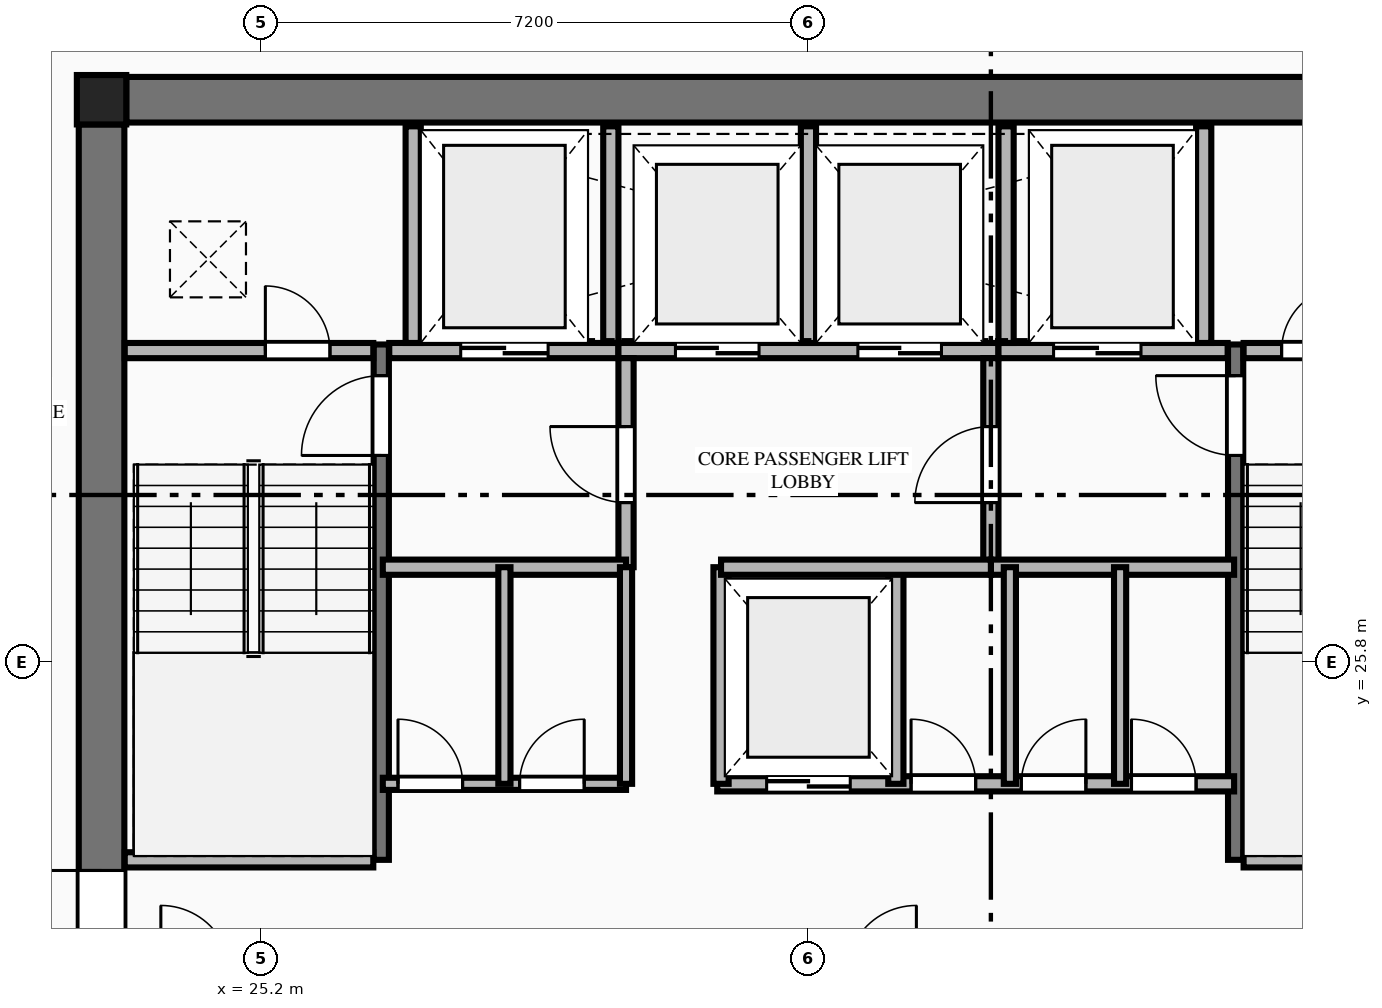
"""IFC4 building model, lengths in metres.
Left out: names, types, materials, properties, quantities, classifications, styles, units other than length and angle.
Written with IfcOpenShell. Run it as: python <this file> out.ifc"""

import sys

from ifc_helpers import new_model, si_unit, direction, frame, frame_2d, origin, origin_2d, place, context, subcontext, project, spatial, rectangle, extrude, element, fill, save


model = new_model("IFC4")
c1 = context("Model", 3, precision=1e-05, world=origin(), true_north=direction((0.0, 1.0)))
c2 = subcontext(c1, "Body", "Model", "MODEL_VIEW")
j1 = project(units=[si_unit("LENGTHUNIT", "METRE"), si_unit("PLANEANGLEUNIT", "RADIAN")], contexts=[c1])
p1 = place(None, origin())
s1 = spatial("IfcSite", under=j1, at=p1, CompositionType="ELEMENT")
p2 = place(p1, origin())
s2 = spatial("IfcBuilding", under=s1, at=p2, CompositionType="ELEMENT")
p3 = place(p2, frame((0.0, 0.0, 175.45)))
s3 = spatial("IfcBuildingStorey", under=s2, at=p3, CompositionType="ELEMENT", Elevation=175.45)
p4 = place(p3, frame((23.1, 33.2, 0.0), z_axis=(0.0, 0.0, 1.0), x_axis=(1.0, 0.0, 0.0)))
e1 = element("IfcColumn", 1, at=p4, inside=s3, PredefinedType="COLUMN", context=c2, shape_type="SweptSolid", body=[
    extrude(rectangle(XDim=0.65, YDim=0.65, at=origin_2d()), origin(), (0.0, 0.0, 1.0), 3.55),
])
p5 = place(p3, frame((23.425, 33.2, 0.0), z_axis=(0.0, 0.0, 1.0), x_axis=(1.0, 0.0, 0.0)))
e2 = element("IfcWall", 2, at=p5, inside=s3, PredefinedType="SHEAR", context=c2, shape_type="SweptSolid", body=[
    extrude(rectangle(XDim=17.95, YDim=0.6, at=frame_2d((8.975, 0.0))), origin(), (0.0, 0.0, 1.0), 3.35),
])
p6 = place(p3, frame((23.1, 18.925, 0.0), z_axis=(0.0, 0.0, 1.0), x_axis=(0.0, 1.0, 0.0)))
e3 = element("IfcWall", 3, at=p6, inside=s3, PredefinedType="SHEAR", context=c2, shape_type="SweptSolid", body=[
    extrude(rectangle(XDim=13.95, YDim=0.6, at=frame_2d((6.975, 0.0))), origin(), (0.0, 0.0, 1.0), 3.35),
])
p7 = place(p6, frame((2.915, 0.0, 0.0)))
e4 = element("IfcOpeningElement", 4, at=p7, cuts=e3, PredefinedType="OPENING", context=c2, shape_type="SweptSolid", body=[
    extrude(rectangle(XDim=1.22, YDim=2.25, at=frame_2d((0.61, 1.125))), frame((0.0, 0.31, 0.0), z_axis=(0.0, -1.0, 0.0), x_axis=(1.0, 0.0, 0.0)), (0.0, 0.0, 1.0), 0.62),
])
p8 = place(p3, frame((26.78, 23.2, 0.0), z_axis=(0.0, 0.0, 1.0), x_axis=(0.0, 1.0, 0.0)))
e5 = element("IfcWall", 5, at=p8, inside=s3, PredefinedType="SHEAR", context=c2, shape_type="SweptSolid", body=[
    extrude(rectangle(XDim=6.78, YDim=0.2, at=frame_2d((3.39, 0.0))), origin(), (0.0, 0.0, 1.0), 3.55),
])
p9 = place(p8, frame((5.32, 0.0, 0.0)))
e6 = element("IfcOpeningElement", 6, at=p9, cuts=e5, PredefinedType="OPENING", context=c2, shape_type="SweptSolid", body=[
    extrude(rectangle(XDim=1.05, YDim=2.15, at=frame_2d((0.525, 1.075))), frame((0.0, 0.11, 0.0), z_axis=(0.0, -1.0, 0.0), x_axis=(1.0, 0.0, 0.0)), (0.0, 0.0, 1.0), 0.22),
])
p10 = place(p3, frame((23.405, 23.2, 0.0), z_axis=(0.0, 0.0, 1.0), x_axis=(1.0, 0.0, 0.0)))
e7 = element("IfcWall", 7, at=p10, inside=s3, PredefinedType="PLUMBINGWALL", context=c2, shape_type="SweptSolid", body=[
    extrude(rectangle(XDim=3.27, YDim=0.2, at=frame_2d((1.635, 0.0))), origin(), (0.0, 0.0, 1.0), 3.35),
])
p11 = place(p3, frame((38.02, 23.2, 0.0), z_axis=(0.0, 0.0, 1.0), x_axis=(0.0, 1.0, 0.0)))
e8 = element("IfcWall", 8, at=p11, inside=s3, PredefinedType="SHEAR", context=c2, shape_type="SweptSolid", body=[
    extrude(rectangle(XDim=6.78, YDim=0.2, at=frame_2d((3.39, 0.0))), origin(), (0.0, 0.0, 1.0), 3.55),
])
p12 = place(p11, frame((5.32, 0.0, 0.0)))
e9 = element("IfcOpeningElement", 9, at=p12, cuts=e8, PredefinedType="OPENING", context=c2, shape_type="SweptSolid", body=[
    extrude(rectangle(XDim=1.05, YDim=2.15, at=frame_2d((0.525, 1.075))), frame((0.0, 0.11, 0.0), z_axis=(0.0, -1.0, 0.0), x_axis=(1.0, 0.0, 0.0)), (0.0, 0.0, 1.0), 0.22),
])
p13 = place(p3, frame((38.125, 23.2, 0.0), z_axis=(0.0, 0.0, 1.0), x_axis=(1.0, 0.0, 0.0)))
e10 = element("IfcWall", 10, at=p13, inside=s3, PredefinedType="PLUMBINGWALL", context=c2, shape_type="SweptSolid", body=[
    extrude(rectangle(XDim=3.27, YDim=0.2, at=frame_2d((1.635, 0.0))), origin(), (0.0, 0.0, 1.0), 3.35),
])
p14 = place(p3, frame((23.405, 29.9, 0.0), z_axis=(0.0, 0.0, 1.0), x_axis=(1.0, 0.0, 0.0)))
e11 = element("IfcWall", 11, at=p14, inside=s3, PredefinedType="PLUMBINGWALL", context=c2, shape_type="SweptSolid", body=[
    extrude(rectangle(XDim=3.27, YDim=0.2, at=frame_2d((1.635, 0.0))), origin(), (0.0, 0.0, 1.0), 3.35),
])
p15 = place(p14, frame((1.85, 0.0, 0.0)))
e12 = element("IfcOpeningElement", 12, at=p15, cuts=e11, PredefinedType="OPENING", context=c2, shape_type="SweptSolid", body=[
    extrude(rectangle(XDim=0.85, YDim=2.05, at=frame_2d((0.425, 1.025))), frame((0.0, 0.11, 0.0), z_axis=(0.0, -1.0, 0.0), x_axis=(1.0, 0.0, 0.0)), (0.0, 0.0, 1.0), 0.22),
])
p16 = place(p3, frame((26.885, 29.9, 0.0), z_axis=(0.0, 0.0, 1.0), x_axis=(1.0, 0.0, 0.0)))
e13 = element("IfcWall", 13, at=p16, inside=s3, PredefinedType="PLUMBINGWALL", context=c2, shape_type="SweptSolid", body=[
    extrude(rectangle(XDim=3.015, YDim=0.2, at=frame_2d((1.507, 0.0))), origin(), (0.0, 0.0, 1.0), 3.35),
])
p17 = place(p16, frame((0.94, 0.0, 0.0)))
e14 = element("IfcOpeningElement", 14, at=p17, cuts=e13, PredefinedType="OPENING", context=c2, shape_type="SweptSolid", body=[
    extrude(rectangle(XDim=1.15, YDim=2.2, at=frame_2d((0.575, 1.1))), frame((0.0, 0.11, 0.0), z_axis=(0.0, -1.0, 0.0), x_axis=(1.0, 0.0, 0.0)), (0.0, 0.0, 1.0), 0.22),
])
p18 = place(p3, frame((29.9, 29.9, 0.0), z_axis=(0.0, 0.0, 1.0), x_axis=(1.0, 0.0, 0.0)))
e15 = element("IfcWall", 15, at=p18, inside=s3, PredefinedType="PLUMBINGWALL", context=c2, shape_type="SweptSolid", body=[
    extrude(rectangle(XDim=5.0, YDim=0.2, at=frame_2d((2.5, 0.0))), origin(), (0.0, 0.0, 1.0), 3.35),
])
p19 = place(p18, frame((0.75, 0.0, 0.0)))
e16 = element("IfcOpeningElement", 16, at=p19, cuts=e15, PredefinedType="OPENING", context=c2, shape_type="SweptSolid", body=[
    extrude(rectangle(XDim=1.1, YDim=2.2, at=frame_2d((0.55, 1.1))), frame((0.0, 0.11, 0.0), z_axis=(0.0, -1.0, 0.0), x_axis=(1.0, 0.0, 0.0)), (0.0, 0.0, 1.0), 0.22),
])
p20 = place(p18, frame((3.15, 0.0, 0.0)))
e17 = element("IfcOpeningElement", 17, at=p20, cuts=e15, PredefinedType="OPENING", context=c2, shape_type="SweptSolid", body=[
    extrude(rectangle(XDim=1.1, YDim=2.2, at=frame_2d((0.55, 1.1))), frame((0.0, 0.11, 0.0), z_axis=(0.0, -1.0, 0.0), x_axis=(1.0, 0.0, 0.0)), (0.0, 0.0, 1.0), 0.22),
])
p21 = place(p3, frame((34.9, 29.9, 0.0), z_axis=(0.0, 0.0, 1.0), x_axis=(1.0, 0.0, 0.0)))
e18 = element("IfcWall", 18, at=p21, inside=s3, PredefinedType="PLUMBINGWALL", context=c2, shape_type="SweptSolid", body=[
    extrude(rectangle(XDim=3.015, YDim=0.2, at=frame_2d((1.508, 0.0))), origin(), (0.0, 0.0, 1.0), 3.35),
])
p22 = place(p21, frame((0.725, 0.0, 0.0)))
e19 = element("IfcOpeningElement", 19, at=p22, cuts=e18, PredefinedType="OPENING", context=c2, shape_type="SweptSolid", body=[
    extrude(rectangle(XDim=1.15, YDim=2.2, at=frame_2d((0.575, 1.1))), frame((0.0, 0.11, 0.0), z_axis=(0.0, -1.0, 0.0), x_axis=(1.0, 0.0, 0.0)), (0.0, 0.0, 1.0), 0.22),
])
p23 = place(p3, frame((38.125, 29.9, 0.0), z_axis=(0.0, 0.0, 1.0), x_axis=(1.0, 0.0, 0.0)))
e20 = element("IfcWall", 20, at=p23, inside=s3, PredefinedType="PLUMBINGWALL", context=c2, shape_type="SweptSolid", body=[
    extrude(rectangle(XDim=3.27, YDim=0.2, at=frame_2d((1.635, 0.0))), origin(), (0.0, 0.0, 1.0), 3.35),
])
p24 = place(p23, frame((0.5, 0.0, 0.0)))
e21 = element("IfcOpeningElement", 21, at=p24, cuts=e20, PredefinedType="OPENING", context=c2, shape_type="SweptSolid", body=[
    extrude(rectangle(XDim=0.85, YDim=2.05, at=frame_2d((0.425, 1.025))), frame((0.0, 0.11, 0.0), z_axis=(0.0, -1.0, 0.0), x_axis=(1.0, 0.0, 0.0)), (0.0, 0.0, 1.0), 0.22),
])
for number, where, z_axis, x_axis in (
    (22, (27.2, 30.0, 0.0), (0.0, 0.0, 1.0), (0.0, 1.0, 0.0)),
    (23, (29.8, 30.0, 0.0), (0.0, 0.0, 1.0), (0.0, 1.0, 0.0)),
    (24, (32.4, 30.0, 0.0), (0.0, 0.0, 1.0), (0.0, 1.0, 0.0)),
    (25, (35.0, 30.0, 0.0), (0.0, 0.0, 1.0), (0.0, 1.0, 0.0)),
    (26, (37.6, 30.0, 0.0), (0.0, 0.0, 1.0), (0.0, 1.0, 0.0)),
):
    element("IfcWall", number, at=place(p3, frame(where, z_axis=z_axis, x_axis=x_axis)), inside=s3, PredefinedType="PLUMBINGWALL", context=c2, shape_type="SweptSolid", body=[
        extrude(rectangle(XDim=2.85, YDim=0.2, at=frame_2d((1.425, 0.0))), origin(), (0.0, 0.0, 1.0), 3.35),
    ])
p25 = place(p3, frame((30.0, 27.05, 0.0), z_axis=(0.0, 0.0, 1.0), x_axis=(0.0, 1.0, 0.0)))
e27 = element("IfcWall", 27, at=p25, inside=s3, PredefinedType="PLUMBINGWALL", context=c2, shape_type="SweptSolid", body=[
    extrude(rectangle(XDim=2.75, YDim=0.2, at=frame_2d((1.375, 0.0))), origin(), (0.0, 0.0, 1.0), 3.35),
])
p26 = place(p25, frame((0.85, 0.0, 0.0)))
e28 = element("IfcOpeningElement", 28, at=p26, cuts=e27, PredefinedType="OPENING", context=c2, shape_type="SweptSolid", body=[
    extrude(rectangle(XDim=1.0, YDim=2.15, at=frame_2d((0.5, 1.075))), frame((0.0, 0.11, 0.0), z_axis=(0.0, -1.0, 0.0), x_axis=(1.0, 0.0, 0.0)), (0.0, 0.0, 1.0), 0.22),
])
p27 = place(p3, frame((26.8, 27.05, 0.0), z_axis=(0.0, 0.0, 1.0), x_axis=(1.0, 0.0, 0.0)))
e29 = element("IfcWall", 29, at=p27, inside=s3, PredefinedType="PLUMBINGWALL", context=c2, shape_type="SweptSolid", body=[
    extrude(rectangle(XDim=3.2, YDim=0.2, at=frame_2d((1.6, 0.0))), origin(), (0.0, 0.0, 1.0), 3.35),
])
p28 = place(p3, frame((34.8, 27.05, 0.0), z_axis=(0.0, 0.0, 1.0), x_axis=(0.0, 1.0, 0.0)))
e30 = element("IfcWall", 30, at=p28, inside=s3, PredefinedType="PLUMBINGWALL", context=c2, shape_type="SweptSolid", body=[
    extrude(rectangle(XDim=2.75, YDim=0.2, at=frame_2d((1.375, 0.0))), origin(), (0.0, 0.0, 1.0), 3.35),
])
p29 = place(p28, frame((0.85, 0.0, 0.0)))
e31 = element("IfcOpeningElement", 31, at=p29, cuts=e30, PredefinedType="OPENING", context=c2, shape_type="SweptSolid", body=[
    extrude(rectangle(XDim=1.0, YDim=2.15, at=frame_2d((0.5, 1.075))), frame((0.0, 0.11, 0.0), z_axis=(0.0, -1.0, 0.0), x_axis=(1.0, 0.0, 0.0)), (0.0, 0.0, 1.0), 0.22),
])
p30 = place(p3, frame((34.8, 27.05, 0.0), z_axis=(0.0, 0.0, 1.0), x_axis=(1.0, 0.0, 0.0)))
e32 = element("IfcWall", 32, at=p30, inside=s3, PredefinedType="PLUMBINGWALL", context=c2, shape_type="SweptSolid", body=[
    extrude(rectangle(XDim=3.2, YDim=0.2, at=frame_2d((1.6, 0.0))), origin(), (0.0, 0.0, 1.0), 3.35),
])
p31 = place(p3, frame((26.8, 24.2, 0.0), z_axis=(0.0, 0.0, 1.0), x_axis=(1.0, 0.0, 0.0)))
e33 = element("IfcWall", 33, at=p31, inside=s3, PredefinedType="PARTITIONING", context=c2, shape_type="SweptSolid", body=[
    extrude(rectangle(XDim=3.2, YDim=0.16, at=frame_2d((1.6, 0.0))), origin(), (0.0, 0.0, 1.0), 3.35),
])
p32 = place(p31, frame((0.2, 0.0, 0.0)))
e34 = element("IfcOpeningElement", 34, at=p32, cuts=e33, PredefinedType="OPENING", context=c2, shape_type="SweptSolid", body=[
    extrude(rectangle(XDim=0.85, YDim=2.05, at=frame_2d((0.425, 1.025))), frame((0.0, 0.09, 0.0), z_axis=(0.0, -1.0, 0.0), x_axis=(1.0, 0.0, 0.0)), (0.0, 0.0, 1.0), 0.18),
])
p33 = place(p31, frame((1.8, 0.0, 0.0)))
e35 = element("IfcOpeningElement", 35, at=p33, cuts=e33, PredefinedType="OPENING", context=c2, shape_type="SweptSolid", body=[
    extrude(rectangle(XDim=0.85, YDim=2.05, at=frame_2d((0.425, 1.025))), frame((0.0, 0.09, 0.0), z_axis=(0.0, -1.0, 0.0), x_axis=(1.0, 0.0, 0.0)), (0.0, 0.0, 1.0), 0.18),
])
p34 = place(p3, frame((30.0, 24.2, 0.0), z_axis=(0.0, 0.0, 1.0), x_axis=(0.0, 1.0, 0.0)))
e36 = element("IfcWall", 36, at=p34, inside=s3, PredefinedType="PARTITIONING", context=c2, shape_type="SweptSolid", body=[
    extrude(rectangle(XDim=2.85, YDim=0.16, at=frame_2d((1.425, 0.0))), origin(), (0.0, 0.0, 1.0), 3.35),
])
p35 = place(p3, frame((31.2, 24.2, 0.0), z_axis=(0.0, 0.0, 1.0), x_axis=(1.0, 0.0, 0.0)))
e37 = element("IfcWall", 37, at=p35, inside=s3, PredefinedType="PLUMBINGWALL", context=c2, shape_type="SweptSolid", body=[
    extrude(rectangle(XDim=6.8, YDim=0.2, at=frame_2d((3.4, 0.0))), origin(), (0.0, 0.0, 1.0), 3.35),
])
p36 = place(p35, frame((0.65, 0.0, 0.0)))
e38 = element("IfcOpeningElement", 38, at=p36, cuts=e37, PredefinedType="OPENING", context=c2, shape_type="SweptSolid", body=[
    extrude(rectangle(XDim=1.1, YDim=2.2, at=frame_2d((0.55, 1.1))), frame((0.0, 0.11, 0.0), z_axis=(0.0, -1.0, 0.0), x_axis=(1.0, 0.0, 0.0)), (0.0, 0.0, 1.0), 0.22),
])
p37 = place(p35, frame((2.55, 0.0, 0.0)))
e39 = element("IfcOpeningElement", 39, at=p37, cuts=e37, PredefinedType="OPENING", context=c2, shape_type="SweptSolid", body=[
    extrude(rectangle(XDim=0.85, YDim=2.05, at=frame_2d((0.425, 1.025))), frame((0.0, 0.11, 0.0), z_axis=(0.0, -1.0, 0.0), x_axis=(1.0, 0.0, 0.0)), (0.0, 0.0, 1.0), 0.22),
])
p38 = place(p35, frame((4.0, 0.0, 0.0)))
e40 = element("IfcOpeningElement", 40, at=p38, cuts=e37, PredefinedType="OPENING", context=c2, shape_type="SweptSolid", body=[
    extrude(rectangle(XDim=0.85, YDim=2.05, at=frame_2d((0.425, 1.025))), frame((0.0, 0.11, 0.0), z_axis=(0.0, -1.0, 0.0), x_axis=(1.0, 0.0, 0.0)), (0.0, 0.0, 1.0), 0.22),
])
p39 = place(p35, frame((5.45, 0.0, 0.0)))
e41 = element("IfcOpeningElement", 41, at=p39, cuts=e37, PredefinedType="OPENING", context=c2, shape_type="SweptSolid", body=[
    extrude(rectangle(XDim=0.85, YDim=2.05, at=frame_2d((0.425, 1.025))), frame((0.0, 0.11, 0.0), z_axis=(0.0, -1.0, 0.0), x_axis=(1.0, 0.0, 0.0)), (0.0, 0.0, 1.0), 0.22),
])
for number, where, z_axis, x_axis in (
    (42, (31.25, 24.2, 0.0), (0.0, 0.0, 1.0), (0.0, 1.0, 0.0)),
    (43, (33.55, 24.2, 0.0), (0.0, 0.0, 1.0), (0.0, 1.0, 0.0)),
):
    element("IfcWall", number, at=place(p3, frame(where, z_axis=z_axis, x_axis=x_axis)), inside=s3, PredefinedType="PLUMBINGWALL", context=c2, shape_type="SweptSolid", body=[
        extrude(rectangle(XDim=2.85, YDim=0.2, at=frame_2d((1.425, 0.0))), origin(), (0.0, 0.0, 1.0), 3.35),
    ])
p40 = place(p3, frame((31.25, 27.05, 0.0), z_axis=(0.0, 0.0, 1.0), x_axis=(1.0, 0.0, 0.0)))
e44 = element("IfcWall", 44, at=p40, inside=s3, PredefinedType="PLUMBINGWALL", context=c2, shape_type="SweptSolid", body=[
    extrude(rectangle(XDim=3.55, YDim=0.2, at=frame_2d((1.775, 0.0))), origin(), (0.0, 0.0, 1.0), 3.35),
])
for number, where, z_axis, x_axis in (
    (45, (28.4, 24.2, 0.0), (0.0, 0.0, 1.0), (0.0, 1.0, 0.0)),
    (46, (35.05, 24.2, 0.0), (0.0, 0.0, 1.0), (0.0, 1.0, 0.0)),
    (47, (36.5, 24.2, 0.0), (0.0, 0.0, 1.0), (0.0, 1.0, 0.0)),
):
    element("IfcWall", number, at=place(p3, frame(where, z_axis=z_axis, x_axis=x_axis)), inside=s3, PredefinedType="PARTITIONING", context=c2, shape_type="SweptSolid", body=[
        extrude(rectangle(XDim=2.85, YDim=0.16, at=frame_2d((1.425, 0.0))), origin(), (0.0, 0.0, 1.0), 3.35),
    ])
p41 = place(p7, origin())
e48 = element("IfcDoor", 48, at=p41, inside=s3, OperationType="SINGLE_SWING_RIGHT", PredefinedType="DOOR", context=c2, shape_type="SweptSolid", body=[
    extrude(rectangle(XDim=1.22, YDim=2.25, at=frame_2d((0.61, 1.125))), frame((0.0, 0.025, 0.0), z_axis=(0.0, -1.0, 0.0), x_axis=(1.0, 0.0, 0.0)), (0.0, 0.0, 1.0), 0.05),
])
fill(e4, e48)
p42 = place(p9, origin())
e49 = element("IfcDoor", 49, at=p42, inside=s3, OperationType="SINGLE_SWING_LEFT", PredefinedType="DOOR", context=c2, shape_type="SweptSolid", body=[
    extrude(rectangle(XDim=1.05, YDim=2.15, at=frame_2d((0.525, 1.075))), frame((0.0, 0.025, 0.0), z_axis=(0.0, -1.0, 0.0), x_axis=(1.0, 0.0, 0.0)), (0.0, 0.0, 1.0), 0.05),
])
fill(e6, e49)
p43 = place(p12, origin())
e50 = element("IfcDoor", 50, at=p43, inside=s3, OperationType="SINGLE_SWING_RIGHT", PredefinedType="DOOR", context=c2, shape_type="SweptSolid", body=[
    extrude(rectangle(XDim=1.05, YDim=2.15, at=frame_2d((0.525, 1.075))), frame((0.0, 0.025, 0.0), z_axis=(0.0, -1.0, 0.0), x_axis=(1.0, 0.0, 0.0)), (0.0, 0.0, 1.0), 0.05),
])
fill(e9, e50)
p44 = place(p15, origin())
e51 = element("IfcDoor", 51, at=p44, inside=s3, OperationType="SINGLE_SWING_LEFT", PredefinedType="DOOR", context=c2, shape_type="SweptSolid", body=[
    extrude(rectangle(XDim=0.85, YDim=2.05, at=frame_2d((0.425, 1.025))), frame((0.0, 0.025, 0.0), z_axis=(0.0, -1.0, 0.0), x_axis=(1.0, 0.0, 0.0)), (0.0, 0.0, 1.0), 0.05),
])
fill(e12, e51)
p45 = place(p24, origin())
e52 = element("IfcDoor", 52, at=p45, inside=s3, OperationType="SINGLE_SWING_RIGHT", PredefinedType="DOOR", context=c2, shape_type="SweptSolid", body=[
    extrude(rectangle(XDim=0.85, YDim=2.05, at=frame_2d((0.425, 1.025))), frame((0.0, 0.025, 0.0), z_axis=(0.0, -1.0, 0.0), x_axis=(1.0, 0.0, 0.0)), (0.0, 0.0, 1.0), 0.05),
])
fill(e21, e52)
p46 = place(p17, origin())
e53 = element("IfcDoor", 53, at=p46, inside=s3, OperationType="DOUBLE_DOOR_SLIDING", PredefinedType="DOOR", context=c2, shape_type="SweptSolid", body=[
    extrude(rectangle(XDim=1.15, YDim=2.2, at=frame_2d((0.575, 1.1))), frame((0.0, 0.025, 0.0), z_axis=(0.0, -1.0, 0.0), x_axis=(1.0, 0.0, 0.0)), (0.0, 0.0, 1.0), 0.05),
])
fill(e14, e53)
p47 = place(p22, origin())
e54 = element("IfcDoor", 54, at=p47, inside=s3, OperationType="DOUBLE_DOOR_SLIDING", PredefinedType="DOOR", context=c2, shape_type="SweptSolid", body=[
    extrude(rectangle(XDim=1.15, YDim=2.2, at=frame_2d((0.575, 1.1))), frame((0.0, 0.025, 0.0), z_axis=(0.0, -1.0, 0.0), x_axis=(1.0, 0.0, 0.0)), (0.0, 0.0, 1.0), 0.05),
])
fill(e19, e54)
p48 = place(p19, origin())
e55 = element("IfcDoor", 55, at=p48, inside=s3, OperationType="DOUBLE_DOOR_SLIDING", PredefinedType="DOOR", context=c2, shape_type="SweptSolid", body=[
    extrude(rectangle(XDim=1.1, YDim=2.2, at=frame_2d((0.55, 1.1))), frame((0.0, 0.025, 0.0), z_axis=(0.0, -1.0, 0.0), x_axis=(1.0, 0.0, 0.0)), (0.0, 0.0, 1.0), 0.05),
])
fill(e16, e55)
p49 = place(p20, origin())
e56 = element("IfcDoor", 56, at=p49, inside=s3, OperationType="DOUBLE_DOOR_SLIDING", PredefinedType="DOOR", context=c2, shape_type="SweptSolid", body=[
    extrude(rectangle(XDim=1.1, YDim=2.2, at=frame_2d((0.55, 1.1))), frame((0.0, 0.025, 0.0), z_axis=(0.0, -1.0, 0.0), x_axis=(1.0, 0.0, 0.0)), (0.0, 0.0, 1.0), 0.05),
])
fill(e17, e56)
p50 = place(p26, origin())
e57 = element("IfcDoor", 57, at=p50, inside=s3, OperationType="SINGLE_SWING_RIGHT", PredefinedType="DOOR", context=c2, shape_type="SweptSolid", body=[
    extrude(rectangle(XDim=1.0, YDim=2.15, at=frame_2d((0.5, 1.075))), frame((0.0, 0.025, 0.0), z_axis=(0.0, -1.0, 0.0), x_axis=(1.0, 0.0, 0.0)), (0.0, 0.0, 1.0), 0.05),
])
fill(e28, e57)
p51 = place(p29, origin())
e58 = element("IfcDoor", 58, at=p51, inside=s3, OperationType="SINGLE_SWING_LEFT", PredefinedType="DOOR", context=c2, shape_type="SweptSolid", body=[
    extrude(rectangle(XDim=1.0, YDim=2.15, at=frame_2d((0.5, 1.075))), frame((0.0, 0.025, 0.0), z_axis=(0.0, -1.0, 0.0), x_axis=(1.0, 0.0, 0.0)), (0.0, 0.0, 1.0), 0.05),
])
fill(e31, e58)
p52 = place(p36, origin())
e59 = element("IfcDoor", 59, at=p52, inside=s3, OperationType="DOUBLE_DOOR_SLIDING", PredefinedType="DOOR", context=c2, shape_type="SweptSolid", body=[
    extrude(rectangle(XDim=1.1, YDim=2.2, at=frame_2d((0.55, 1.1))), frame((0.0, 0.025, 0.0), z_axis=(0.0, -1.0, 0.0), x_axis=(1.0, 0.0, 0.0)), (0.0, 0.0, 1.0), 0.05),
])
fill(e38, e59)
p53 = place(p32, origin())
e60 = element("IfcDoor", 60, at=p53, inside=s3, OperationType="SINGLE_SWING_LEFT", PredefinedType="DOOR", context=c2, shape_type="SweptSolid", body=[
    extrude(rectangle(XDim=0.85, YDim=2.05, at=frame_2d((0.425, 1.025))), frame((0.0, 0.025, 0.0), z_axis=(0.0, -1.0, 0.0), x_axis=(1.0, 0.0, 0.0)), (0.0, 0.0, 1.0), 0.05),
])
fill(e34, e60)
p54 = place(p33, origin())
e61 = element("IfcDoor", 61, at=p54, inside=s3, OperationType="SINGLE_SWING_RIGHT", PredefinedType="DOOR", context=c2, shape_type="SweptSolid", body=[
    extrude(rectangle(XDim=0.85, YDim=2.05, at=frame_2d((0.425, 1.025))), frame((0.0, 0.025, 0.0), z_axis=(0.0, -1.0, 0.0), x_axis=(1.0, 0.0, 0.0)), (0.0, 0.0, 1.0), 0.05),
])
fill(e35, e61)
p55 = place(p37, origin())
e62 = element("IfcDoor", 62, at=p55, inside=s3, OperationType="SINGLE_SWING_LEFT", PredefinedType="DOOR", context=c2, shape_type="SweptSolid", body=[
    extrude(rectangle(XDim=0.85, YDim=2.05, at=frame_2d((0.425, 1.025))), frame((0.0, 0.025, 0.0), z_axis=(0.0, -1.0, 0.0), x_axis=(1.0, 0.0, 0.0)), (0.0, 0.0, 1.0), 0.05),
])
fill(e39, e62)
p56 = place(p38, origin())
e63 = element("IfcDoor", 63, at=p56, inside=s3, OperationType="SINGLE_SWING_RIGHT", PredefinedType="DOOR", context=c2, shape_type="SweptSolid", body=[
    extrude(rectangle(XDim=0.85, YDim=2.05, at=frame_2d((0.425, 1.025))), frame((0.0, 0.025, 0.0), z_axis=(0.0, -1.0, 0.0), x_axis=(1.0, 0.0, 0.0)), (0.0, 0.0, 1.0), 0.05),
])
fill(e40, e63)
p57 = place(p39, origin())
e64 = element("IfcDoor", 64, at=p57, inside=s3, OperationType="SINGLE_SWING_LEFT", PredefinedType="DOOR", context=c2, shape_type="SweptSolid", body=[
    extrude(rectangle(XDim=0.85, YDim=2.05, at=frame_2d((0.425, 1.025))), frame((0.0, 0.025, 0.0), z_axis=(0.0, -1.0, 0.0), x_axis=(1.0, 0.0, 0.0)), (0.0, 0.0, 1.0), 0.05),
])
fill(e41, e64)
save(model, sys.argv[1])
